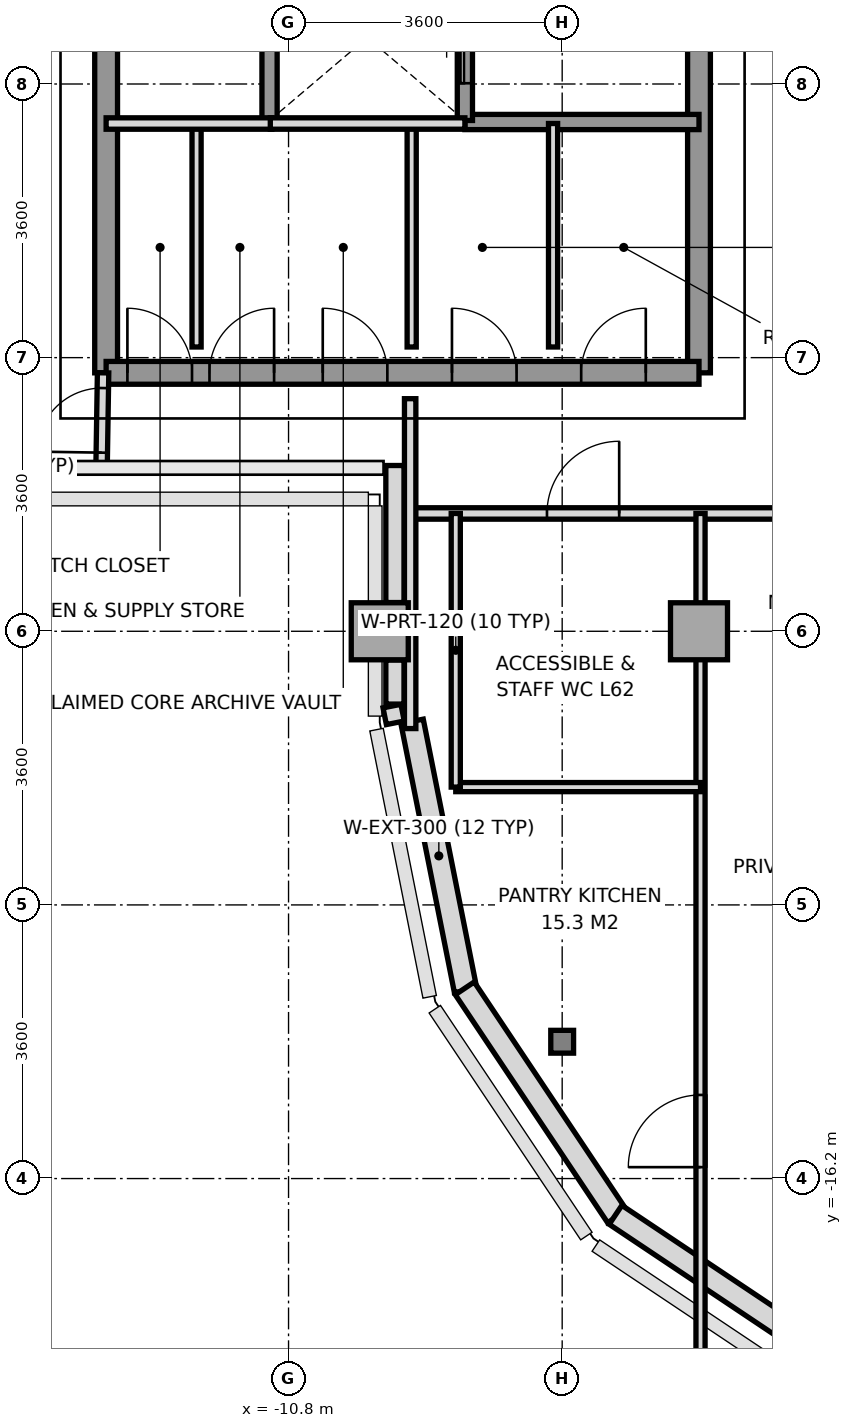
"""IFC4 building model, lengths in metres.
Left out: names, types, materials, properties, quantities, classifications, styles, units other than length and angle.
Written with IfcOpenShell. Run it as: python <this file> out.ifc"""

import sys

from ifc_helpers import new_model, si_unit, direction, frame, frame_2d, origin, origin_2d, place, context, subcontext, project, spatial, rectangle, i_section, extrude, source, transform, mapped, element, fill, save


model = new_model("IFC4")
c1 = context("Model", 3, precision=1e-05, world=origin(), true_north=direction((0.0, 1.0)))
c2 = subcontext(c1, "Body", "Model", "MODEL_VIEW")
j1 = project(units=[si_unit("LENGTHUNIT", "METRE"), si_unit("PLANEANGLEUNIT", "RADIAN")], contexts=[c1])
p1 = place(None, origin())
s1 = spatial("IfcSite", under=j1, at=p1, CompositionType="ELEMENT")
p2 = place(p1, origin())
s2 = spatial("IfcBuilding", under=s1, at=p2, CompositionType="ELEMENT")
p3 = place(p2, frame((0.0, 0.0, 226.8)))
s3 = spatial("IfcBuildingStorey", under=s2, at=p3, CompositionType="ELEMENT", Elevation=226.8)
m1 = source(origin(), c2, "Body", "SweptSolid", [
    extrude(rectangle(XDim=0.75, YDim=0.75, at=origin_2d()), origin(), (0.0, 0.0, 1.0), 3.01),
])
p4 = place(p3, frame((-9.6, -9.0, 0.0), z_axis=(0.0, 0.0, 1.0), x_axis=(1.0, 0.0, 0.0)))
e1 = element("IfcColumn", 1, at=p4, inside=s3, PredefinedType="COLUMN", context=c2, shape_type="MappedRepresentation", body=[
    mapped(m1, transform((0.0, 0.0, 0.0), x_axis=(1.0, 0.0, 0.0), y_axis=(0.0, 1.0, 0.0), z_axis=(0.0, 0.0, 1.0), scale=1.0)),
])
m2 = source(origin(), c2, "Body", "SweptSolid", [
    extrude(i_section(OverallWidth=0.3, OverallDepth=0.3, WebThickness=0.011, FlangeThickness=0.019, at=origin_2d()), origin(), (0.0, 0.0, 1.0), 3.01),
])
p5 = place(p3, frame((-7.2, -14.4, 0.0), z_axis=(0.0, 0.0, 1.0), x_axis=(1.0, 0.0, 0.0)))
e2 = element("IfcColumn", 2, at=p5, inside=s3, PredefinedType="COLUMN", context=c2, shape_type="MappedRepresentation", body=[
    mapped(m2, transform((0.0, 0.0, 0.0), x_axis=(1.0, 0.0, 0.0), y_axis=(0.0, 1.0, 0.0), z_axis=(0.0, 0.0, 1.0), scale=1.0)),
])
p6 = place(p3, frame((-5.4, -9.0, 0.0), z_axis=(0.0, 0.0, 1.0), x_axis=(1.0, 0.0, 0.0)))
e3 = element("IfcColumn", 3, at=p6, inside=s3, PredefinedType="COLUMN", context=c2, shape_type="MappedRepresentation", body=[
    mapped(m1, transform((0.0, 0.0, 0.0), x_axis=(1.0, 0.0, 0.0), y_axis=(0.0, 1.0, 0.0), z_axis=(0.0, 0.0, 1.0), scale=1.0)),
])
p7 = place(p3, frame((-9.175, -10.185, 0.0), z_axis=(0.0, 0.0, 1.0), x_axis=(0.195114232679, -0.980780523974, 0.0)))
e4 = element("IfcWall", 4, at=p7, inside=s3, PredefinedType="SOLIDWALL", context=c2, shape_type="SweptSolid", body=[
    extrude(rectangle(XDim=3.609, YDim=0.3, at=frame_2d((1.804, 0.0))), origin(), (0.0, 0.0, 1.0), 3.01),
])
p8 = place(p3, frame((-8.482, -13.698, 0.0), z_axis=(0.0, 0.0, 1.0), x_axis=(0.555574187116, -0.831466970246, 0.0)))
e5 = element("IfcWall", 5, at=p8, inside=s3, PredefinedType="SOLIDWALL", context=c2, shape_type="SweptSolid", body=[
    extrude(rectangle(XDim=3.609, YDim=0.3, at=frame_2d((1.804, 0.0))), origin(), (0.0, 0.0, 1.0), 2.61),
])
p9 = place(p3, frame((-6.498, -16.677, 0.0), z_axis=(0.0, 0.0, 1.0), x_axis=(0.831443568068, -0.555609208993, 0.0)))
e6 = element("IfcWall", 6, at=p9, inside=s3, PredefinedType="SOLIDWALL", context=c2, shape_type="SweptSolid", body=[
    extrude(rectangle(XDim=3.594, YDim=0.3, at=frame_2d((1.797, 0.0))), origin(), (0.0, 0.0, 1.0), 3.01),
])
p10 = place(p3, frame((-9.395, -10.204, 0.0), z_axis=(0.0, 0.0, 1.0), x_axis=(-0.194859894132, 0.980831087221, 0.0)))
e7 = element("IfcWall", 7, at=p10, inside=s3, PredefinedType="PARAPET", context=c2, shape_type="SweptSolid", body=[
    extrude(rectangle(XDim=0.224, YDim=0.24, at=frame_2d((0.112, 0.0))), origin(), (0.0, 0.0, 1.0), 1.15),
])
p11 = place(p3, frame((-9.4, -9.958, 0.0), z_axis=(0.0, 0.0, 1.0), x_axis=(0.0, 1.0, 0.0)))
e8 = element("IfcWall", 8, at=p11, inside=s3, PredefinedType="PARAPET", context=c2, shape_type="SweptSolid", body=[
    extrude(rectangle(XDim=0.58, YDim=0.24, at=frame_2d((0.29, 0.0))), origin(), (0.0, 0.0, 1.0), 1.15),
])
p12 = place(p3, frame((-9.4, -8.622, 0.0), z_axis=(0.0, 0.0, 1.0), x_axis=(0.0, 1.0, 0.0)))
e9 = element("IfcWall", 9, at=p12, inside=s3, PredefinedType="PARAPET", context=c2, shape_type="SweptSolid", body=[
    extrude(rectangle(XDim=1.803, YDim=0.24, at=frame_2d((0.901, 0.0))), origin(), (0.0, 0.0, 1.0), 1.15),
])
p13 = place(p3, frame((-13.2, -5.6, 0.0), z_axis=(0.0, 0.0, 1.0), x_axis=(0.0, 1.0, 0.0)))
e10 = element("IfcWall", 10, at=p13, inside=s3, PredefinedType="SHEAR", context=c2, shape_type="SweptSolid", body=[
    extrude(rectangle(XDim=11.2, YDim=0.3, at=frame_2d((5.6, 0.0))), origin(), (0.0, 0.0, 1.0), 3.01),
])
p14 = place(p3, frame((-5.4, -5.6, 0.0), z_axis=(0.0, 0.0, 1.0), x_axis=(0.0, 1.0, 0.0)))
e11 = element("IfcWall", 11, at=p14, inside=s3, PredefinedType="SHEAR", context=c2, shape_type="SweptSolid", body=[
    extrude(rectangle(XDim=12.5, YDim=0.3, at=frame_2d((6.25, 0.0))), origin(), (0.0, 0.0, 1.0), 3.01),
])
p15 = place(p14, frame((4.55, 0.0, 0.0)))
e12 = element("IfcOpeningElement", 12, at=p15, cuts=e11, PredefinedType="OPENING", context=c2, shape_type="SweptSolid", body=[
    extrude(rectangle(XDim=1.2, YDim=2.2, at=frame_2d((0.6, 1.1))), frame((0.0, 0.16, 0.0), z_axis=(0.0, -1.0, 0.0), x_axis=(1.0, 0.0, 0.0)), (0.0, 0.0, 1.0), 0.32),
])
p16 = place(p14, frame((10.45, 0.0, 0.0)))
e13 = element("IfcOpeningElement", 13, at=p16, cuts=e11, PredefinedType="OPENING", context=c2, shape_type="SweptSolid", body=[
    extrude(rectangle(XDim=1.2, YDim=2.2, at=frame_2d((0.6, 1.1))), frame((0.0, 0.16, 0.0), z_axis=(0.0, -1.0, 0.0), x_axis=(1.0, 0.0, 0.0)), (0.0, 0.0, 1.0), 0.32),
])
p17 = place(p14, frame((6.86, 0.0, 0.0)))
e14 = element("IfcOpeningElement", 14, at=p17, cuts=e11, PredefinedType="OPENING", context=c2, shape_type="SweptSolid", body=[
    extrude(rectangle(XDim=0.8, YDim=2.1, at=frame_2d((0.4, 1.05))), frame((0.0, 0.16, 0.0), z_axis=(0.0, -1.0, 0.0), x_axis=(1.0, 0.0, 0.0)), (0.0, 0.0, 1.0), 0.32),
])
p18 = place(p3, frame((-13.2, -5.6, 0.0), z_axis=(0.0, 0.0, 1.0), x_axis=(1.0, 0.0, 0.0)))
e15 = element("IfcWall", 15, at=p18, inside=s3, PredefinedType="SHEAR", context=c2, shape_type="SweptSolid", body=[
    extrude(rectangle(XDim=7.8, YDim=0.3, at=frame_2d((3.9, 0.0))), origin(), (0.0, 0.0, 1.0), 3.01),
])
p19 = place(p18, frame((0.28, 0.0, 0.0)))
e16 = element("IfcOpeningElement", 16, at=p19, cuts=e15, PredefinedType="OPENING", context=c2, shape_type="SweptSolid", body=[
    extrude(rectangle(XDim=0.85, YDim=2.1, at=frame_2d((0.425, 1.05))), frame((0.0, 0.16, 0.0), z_axis=(0.0, -1.0, 0.0), x_axis=(1.0, 0.0, 0.0)), (0.0, 0.0, 1.0), 0.32),
])
p20 = place(p18, frame((1.36, 0.0, 0.0)))
e17 = element("IfcOpeningElement", 17, at=p20, cuts=e15, PredefinedType="OPENING", context=c2, shape_type="SweptSolid", body=[
    extrude(rectangle(XDim=0.85, YDim=2.1, at=frame_2d((0.425, 1.05))), frame((0.0, 0.16, 0.0), z_axis=(0.0, -1.0, 0.0), x_axis=(1.0, 0.0, 0.0)), (0.0, 0.0, 1.0), 0.32),
])
p21 = place(p18, frame((2.85, 0.0, 0.0)))
e18 = element("IfcOpeningElement", 18, at=p21, cuts=e15, PredefinedType="OPENING", context=c2, shape_type="SweptSolid", body=[
    extrude(rectangle(XDim=0.85, YDim=2.1, at=frame_2d((0.425, 1.05))), frame((0.0, 0.16, 0.0), z_axis=(0.0, -1.0, 0.0), x_axis=(1.0, 0.0, 0.0)), (0.0, 0.0, 1.0), 0.32),
])
p22 = place(p18, frame((4.55, 0.0, 0.0)))
e19 = element("IfcOpeningElement", 19, at=p22, cuts=e15, PredefinedType="OPENING", context=c2, shape_type="SweptSolid", body=[
    extrude(rectangle(XDim=0.85, YDim=2.1, at=frame_2d((0.425, 1.05))), frame((0.0, 0.16, 0.0), z_axis=(0.0, -1.0, 0.0), x_axis=(1.0, 0.0, 0.0)), (0.0, 0.0, 1.0), 0.32),
])
p23 = place(p18, frame((6.25, 0.0, 0.0)))
e20 = element("IfcOpeningElement", 20, at=p23, cuts=e15, PredefinedType="OPENING", context=c2, shape_type="SweptSolid", body=[
    extrude(rectangle(XDim=0.85, YDim=2.1, at=frame_2d((0.425, 1.05))), frame((0.0, 0.16, 0.0), z_axis=(0.0, -1.0, 0.0), x_axis=(1.0, 0.0, 0.0)), (0.0, 0.0, 1.0), 0.32),
])
p24 = place(p3, frame((-8.48, -2.3, 0.0), z_axis=(0.0, 0.0, 1.0), x_axis=(1.0, 0.0, 0.0)))
e21 = element("IfcWall", 21, at=p24, inside=s3, PredefinedType="SOLIDWALL", context=c2, shape_type="SweptSolid", body=[
    extrude(rectangle(XDim=3.08, YDim=0.2, at=frame_2d((1.54, 0.0))), origin(), (0.0, 0.0, 1.0), 3.01),
])
p25 = place(p3, frame((-11.05, -2.28, 0.0), z_axis=(0.0, 0.0, 1.0), x_axis=(0.0, 1.0, 0.0)))
e22 = element("IfcWall", 22, at=p25, inside=s3, PredefinedType="SOLIDWALL", context=c2, shape_type="SweptSolid", body=[
    extrude(rectangle(XDim=2.18, YDim=0.2, at=frame_2d((1.09, 0.0))), origin(), (0.0, 0.0, 1.0), 3.01),
])
p26 = place(p3, frame((-8.48, -2.28, 0.0), z_axis=(0.0, 0.0, 1.0), x_axis=(0.0, 1.0, 0.0)))
e23 = element("IfcWall", 23, at=p26, inside=s3, PredefinedType="SOLIDWALL", context=c2, shape_type="SweptSolid", body=[
    extrude(rectangle(XDim=2.18, YDim=0.2, at=frame_2d((1.09, 0.0))), origin(), (0.0, 0.0, 1.0), 3.01),
])
p27 = place(p26, frame((0.49, 0.0, 0.0)))
e24 = element("IfcOpeningElement", 24, at=p27, cuts=e23, PredefinedType="OPENING", context=c2, shape_type="SweptSolid", body=[
    extrude(rectangle(XDim=1.2, YDim=2.2, at=frame_2d((0.6, 1.1))), frame((0.0, 0.11, 0.0), z_axis=(0.0, -1.0, 0.0), x_axis=(1.0, 0.0, 0.0)), (0.0, 0.0, 1.0), 0.22),
])
p28 = place(p3, frame((-12.01, -5.26, 0.0), z_axis=(0.0, 0.0, 1.0), x_axis=(0.0, 1.0, 0.0)))
e25 = element("IfcWall", 25, at=p28, inside=s3, PredefinedType="PARTITIONING", context=c2, shape_type="SweptSolid", body=[
    extrude(rectangle(XDim=2.94, YDim=0.12, at=frame_2d((1.47, 0.0))), origin(), (0.0, 0.0, 1.0), 3.01),
])
p29 = place(p3, frame((-13.2, -2.32, 0.0), z_axis=(0.0, 0.0, 1.0), x_axis=(1.0, 0.0, 0.0)))
e26 = element("IfcWall", 26, at=p29, inside=s3, PredefinedType="PARTITIONING", context=c2, shape_type="SweptSolid", body=[
    extrude(rectangle(XDim=2.18, YDim=0.15, at=frame_2d((1.09, 0.0))), origin(), (0.0, 0.0, 1.0), 3.01),
])
for number, where, z_axis, x_axis in (
    (27, (-9.18, -5.26, 0.0), (0.0, 0.0, 1.0), (0.0, 1.0, 0.0)),
    (28, (-7.32, -5.26, 0.0), (0.0, 0.0, 1.0), (0.0, 1.0, 0.0)),
):
    element("IfcWall", number, at=place(p3, frame(where, z_axis=z_axis, x_axis=x_axis)), inside=s3, PredefinedType="PARTITIONING", context=c2, shape_type="SweptSolid", body=[
        extrude(rectangle(XDim=2.94, YDim=0.12, at=frame_2d((1.47, 0.0))), origin(), (0.0, 0.0, 1.0), 3.01),
    ])
p30 = place(p3, frame((-11.04, -2.32, 0.0), z_axis=(0.0, 0.0, 1.0), x_axis=(1.0, 0.0, 0.0)))
e29 = element("IfcWall", 29, at=p30, inside=s3, PredefinedType="PARTITIONING", context=c2, shape_type="SweptSolid", body=[
    extrude(rectangle(XDim=2.56, YDim=0.15, at=frame_2d((1.28, 0.0))), origin(), (0.0, 0.0, 1.0), 3.01),
])
p31 = place(p3, frame((-9.2, -7.45, 0.0), z_axis=(0.0, 0.0, 1.0), x_axis=(1.0, 0.0, 0.0)))
e30 = element("IfcWall", 30, at=p31, inside=s3, PredefinedType="PARTITIONING", context=c2, shape_type="SweptSolid", body=[
    extrude(rectangle(XDim=18.4, YDim=0.15, at=frame_2d((9.2, 0.0))), origin(), (0.0, 0.0, 1.0), 2.57),
])
p32 = place(p31, frame((1.8, 0.0, 0.0)))
e31 = element("IfcOpeningElement", 31, at=p32, cuts=e30, PredefinedType="OPENING", context=c2, shape_type="SweptSolid", body=[
    extrude(rectangle(XDim=0.95, YDim=2.15, at=frame_2d((0.475, 1.075))), frame((0.0, 0.085, 0.0), z_axis=(0.0, -1.0, 0.0), x_axis=(1.0, 0.0, 0.0)), (0.0, 0.0, 1.0), 0.17),
])
p33 = place(p31, frame((6.15, 0.0, 0.0)))
e32 = element("IfcOpeningElement", 32, at=p33, cuts=e30, PredefinedType="OPENING", context=c2, shape_type="SweptSolid", body=[
    extrude(rectangle(XDim=0.95, YDim=2.15, at=frame_2d((0.475, 1.075))), frame((0.0, 0.085, 0.0), z_axis=(0.0, -1.0, 0.0), x_axis=(1.0, 0.0, 0.0)), (0.0, 0.0, 1.0), 0.17),
])
p34 = place(p31, frame((10.6, 0.0, 0.0)))
e33 = element("IfcOpeningElement", 33, at=p34, cuts=e30, PredefinedType="OPENING", context=c2, shape_type="SweptSolid", body=[
    extrude(rectangle(XDim=1.1, YDim=2.2, at=frame_2d((0.55, 1.1))), frame((0.0, 0.085, 0.0), z_axis=(0.0, -1.0, 0.0), x_axis=(1.0, 0.0, 0.0)), (0.0, 0.0, 1.0), 0.17),
])
p35 = place(p31, frame((15.2, 0.0, 0.0)))
e34 = element("IfcOpeningElement", 34, at=p35, cuts=e30, PredefinedType="OPENING", context=c2, shape_type="SweptSolid", body=[
    extrude(rectangle(XDim=0.95, YDim=2.15, at=frame_2d((0.475, 1.075))), frame((0.0, 0.085, 0.0), z_axis=(0.0, -1.0, 0.0), x_axis=(1.0, 0.0, 0.0)), (0.0, 0.0, 1.0), 0.17),
])
p36 = place(p3, frame((-9.2, -10.28, 0.0), z_axis=(0.0, 0.0, 1.0), x_axis=(0.0, 1.0, 0.0)))
e35 = element("IfcWall", 35, at=p36, inside=s3, PredefinedType="PARTITIONING", context=c2, shape_type="SweptSolid", body=[
    extrude(rectangle(XDim=4.34, YDim=0.15, at=frame_2d((2.17, 0.0))), origin(), (0.0, 0.0, 1.0), 2.61),
])
p37 = place(p3, frame((-5.38, -19.25, 0.0), z_axis=(0.0, 0.0, 1.0), x_axis=(0.0, 1.0, 0.0)))
e36 = element("IfcWall", 36, at=p37, inside=s3, PredefinedType="PARTITIONING", context=c2, shape_type="SweptSolid", body=[
    extrude(rectangle(XDim=11.8, YDim=0.12, at=frame_2d((5.9, 0.0))), origin(), (0.0, 0.0, 1.0), 2.61),
])
p38 = place(p37, frame((3.2, 0.0, 0.0)))
e37 = element("IfcOpeningElement", 37, at=p38, cuts=e36, PredefinedType="OPENING", context=c2, shape_type="SweptSolid", body=[
    extrude(rectangle(XDim=0.95, YDim=2.15, at=frame_2d((0.475, 1.075))), frame((0.0, 0.07, 0.0), z_axis=(0.0, -1.0, 0.0), x_axis=(1.0, 0.0, 0.0)), (0.0, 0.0, 1.0), 0.14),
])
p39 = place(p3, frame((-8.6, -11.05, 0.0), z_axis=(0.0, 0.0, 1.0), x_axis=(1.0, 0.0, 0.0)))
e38 = element("IfcWall", 38, at=p39, inside=s3, PredefinedType="PARTITIONING", context=c2, shape_type="SweptSolid", body=[
    extrude(rectangle(XDim=3.22, YDim=0.12, at=frame_2d((1.61, 0.0))), origin(), (0.0, 0.0, 1.0), 3.01),
])
p40 = place(p3, frame((-8.6, -11.05, 0.0), z_axis=(0.0, 0.0, 1.0), x_axis=(0.0, 1.0, 0.0)))
e39 = element("IfcWall", 39, at=p40, inside=s3, PredefinedType="PARTITIONING", context=c2, shape_type="SweptSolid", body=[
    extrude(rectangle(XDim=3.6, YDim=0.12, at=frame_2d((1.8, 0.0))), origin(), (0.0, 0.0, 1.0), 2.61),
])
p41 = place(p3, frame((-13.26, -6.85, 0.0), z_axis=(0.0, 0.0, 1.0), x_axis=(0.016013571389, 0.999871774545, 0.0)))
e40 = element("IfcWall", 40, at=p41, inside=s3, PredefinedType="PARTITIONING", context=c2, shape_type="SweptSolid", body=[
    extrude(rectangle(XDim=1.25, YDim=0.15, at=frame_2d((0.625, 0.0))), origin(), (0.0, 0.0, 1.0), 3.01),
])
p42 = place(p41, frame((0.2, 0.0, 0.0)))
e41 = element("IfcOpeningElement", 41, at=p42, cuts=e40, PredefinedType="OPENING", context=c2, shape_type="SweptSolid", body=[
    extrude(rectangle(XDim=0.85, YDim=2.1, at=frame_2d((0.425, 1.05))), frame((0.0, 0.085, 0.0), z_axis=(0.0, -1.0, 0.0), x_axis=(1.0, 0.0, 0.0)), (0.0, 0.0, 1.0), 0.17),
])
m3 = source(origin(), c2, "Body", "SweptSolid", [
    extrude(rectangle(XDim=0.85, YDim=2.1, at=frame_2d((0.425, 1.05))), frame((0.0, 0.025, 0.0), z_axis=(0.0, -1.0, 0.0), x_axis=(1.0, 0.0, 0.0)), (0.0, 0.0, 1.0), 0.05),
])
p43 = place(p19, origin())
e42 = element("IfcDoor", 42, at=p43, inside=s3, OperationType="SINGLE_SWING_LEFT", PredefinedType="DOOR", context=c2, shape_type="MappedRepresentation", body=[
    mapped(m3, transform((0.0, 0.0, 0.0), x_axis=(1.0, 0.0, 0.0), y_axis=(0.0, 1.0, 0.0), z_axis=(0.0, 0.0, 1.0), scale=1.0)),
])
fill(e16, e42)
p44 = place(p20, origin())
e43 = element("IfcDoor", 43, at=p44, inside=s3, OperationType="SINGLE_SWING_RIGHT", PredefinedType="DOOR", context=c2, shape_type="MappedRepresentation", body=[
    mapped(m3, transform((0.0, 0.0, 0.0), x_axis=(1.0, 0.0, 0.0), y_axis=(0.0, 1.0, 0.0), z_axis=(0.0, 0.0, 1.0), scale=1.0)),
])
fill(e17, e43)
p45 = place(p21, origin())
e44 = element("IfcDoor", 44, at=p45, inside=s3, OperationType="SINGLE_SWING_LEFT", PredefinedType="DOOR", context=c2, shape_type="MappedRepresentation", body=[
    mapped(m3, transform((0.0, 0.0, 0.0), x_axis=(1.0, 0.0, 0.0), y_axis=(0.0, 1.0, 0.0), z_axis=(0.0, 0.0, 1.0), scale=1.0)),
])
fill(e18, e44)
p46 = place(p22, origin())
e45 = element("IfcDoor", 45, at=p46, inside=s3, OperationType="SINGLE_SWING_LEFT", PredefinedType="DOOR", context=c2, shape_type="MappedRepresentation", body=[
    mapped(m3, transform((0.0, 0.0, 0.0), x_axis=(1.0, 0.0, 0.0), y_axis=(0.0, 1.0, 0.0), z_axis=(0.0, 0.0, 1.0), scale=1.0)),
])
fill(e19, e45)
p47 = place(p23, origin())
e46 = element("IfcDoor", 46, at=p47, inside=s3, OperationType="SINGLE_SWING_RIGHT", PredefinedType="DOOR", context=c2, shape_type="MappedRepresentation", body=[
    mapped(m3, transform((0.0, 0.0, 0.0), x_axis=(1.0, 0.0, 0.0), y_axis=(0.0, 1.0, 0.0), z_axis=(0.0, 0.0, 1.0), scale=1.0)),
])
fill(e20, e46)
m4 = source(origin(), c2, "Body", "SweptSolid", [
    extrude(rectangle(XDim=1.2, YDim=2.2, at=frame_2d((0.6, 1.1))), frame((0.0, 0.025, 0.0), z_axis=(0.0, -1.0, 0.0), x_axis=(1.0, 0.0, 0.0)), (0.0, 0.0, 1.0), 0.05),
])
p48 = place(p27, origin())
e47 = element("IfcDoor", 47, at=p48, inside=s3, OperationType="SLIDING_TO_RIGHT", PredefinedType="DOOR", context=c2, shape_type="MappedRepresentation", body=[
    mapped(m4, transform((0.0, 0.0, 0.0), x_axis=(1.0, 0.0, 0.0), y_axis=(0.0, 1.0, 0.0), z_axis=(0.0, 0.0, 1.0), scale=1.0)),
])
fill(e24, e47)
m5 = source(origin(), c2, "Body", "SweptSolid", [
    extrude(rectangle(XDim=0.95, YDim=2.15, at=frame_2d((0.475, 1.075))), frame((0.0, 0.025, 0.0), z_axis=(0.0, -1.0, 0.0), x_axis=(1.0, 0.0, 0.0)), (0.0, 0.0, 1.0), 0.05),
])
p49 = place(p32, origin())
e48 = element("IfcDoor", 48, at=p49, inside=s3, OperationType="SINGLE_SWING_RIGHT", PredefinedType="DOOR", context=c2, shape_type="MappedRepresentation", body=[
    mapped(m5, transform((0.0, 0.0, 0.0), x_axis=(1.0, 0.0, 0.0), y_axis=(0.0, 1.0, 0.0), z_axis=(0.0, 0.0, 1.0), scale=1.0)),
])
fill(e31, e48)
p50 = place(p38, origin())
e49 = element("IfcDoor", 49, at=p50, inside=s3, OperationType="SINGLE_SWING_LEFT", PredefinedType="DOOR", context=c2, shape_type="MappedRepresentation", body=[
    mapped(m5, transform((0.0, 0.0, 0.0), x_axis=(1.0, 0.0, 0.0), y_axis=(0.0, 1.0, 0.0), z_axis=(0.0, 0.0, 1.0), scale=1.0)),
])
fill(e37, e49)
p51 = place(p42, origin())
e50 = element("IfcDoor", 50, at=p51, inside=s3, OperationType="SINGLE_SWING_LEFT", PredefinedType="DOOR", context=c2, shape_type="MappedRepresentation", body=[
    mapped(m3, transform((0.0, 0.0, 0.0), x_axis=(1.0, 0.0, 0.0), y_axis=(0.0, 1.0, 0.0), z_axis=(0.0, 0.0, 1.0), scale=1.0)),
])
fill(e41, e50)
save(model, sys.argv[1])
